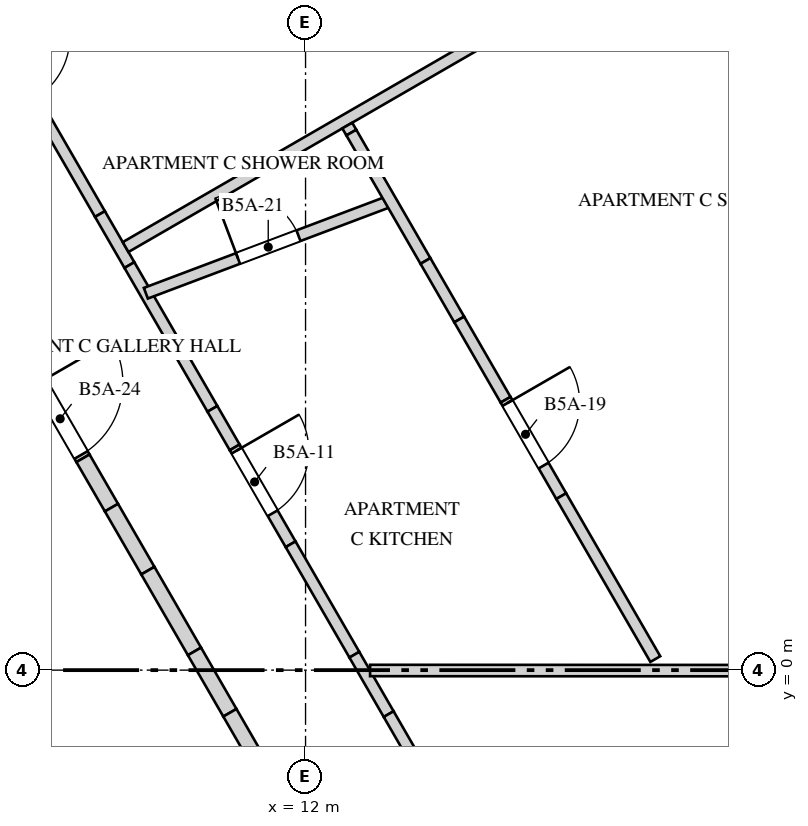
"""IFC4 building model, lengths in metres.
Left out: names, types, materials, properties, quantities, classifications, styles, units other than length and angle.
Written with IfcOpenShell. Run it as: python <this file> out.ifc"""

import sys

from ifc_helpers import new_model, si_unit, direction, frame, frame_2d, origin, place, context, subcontext, project, spatial, polyline, rectangle, outline, extrude, element, fill, save


model = new_model("IFC4")
c1 = context("Model", 3, precision=1e-05, world=origin(), true_north=direction((0.0, 1.0)))
c2 = subcontext(c1, "Body", "Model", "MODEL_VIEW")
j1 = project(units=[si_unit("LENGTHUNIT", "METRE"), si_unit("PLANEANGLEUNIT", "RADIAN")], contexts=[c1])
p1 = place(None, origin())
s1 = spatial("IfcSite", under=j1, at=p1, CompositionType="ELEMENT")
p2 = place(p1, origin())
s2 = spatial("IfcBuilding", under=s1, at=p2, CompositionType="ELEMENT")
p3 = place(p2, frame((0.0, 0.0, 200.0)))
s3 = spatial("IfcBuildingStorey", under=s2, at=p3, CompositionType="ELEMENT", Elevation=200.0)
p4 = place(p3, frame((9.815, -4.25, 0.0), z_axis=(0.0, 0.0, 1.0), x_axis=(-0.500002161919, 0.866024155596, 0.0)))
e1 = element("IfcWall", 1, at=p4, inside=s3, PredefinedType="SHEAR", context=c2, shape_type="SweptSolid", body=[
    extrude(rectangle(XDim=17.176, YDim=0.75, at=frame_2d((8.588, 0.0))), origin(), (0.0, 0.0, 1.0), 4.0),
])
p5 = place(p4, frame((6.863, 0.0, 0.0)))
e2 = element("IfcOpeningElement", 2, at=p5, cuts=e1, PredefinedType="OPENING", context=c2, shape_type="SweptSolid", body=[
    extrude(rectangle(XDim=1.0, YDim=2.4, at=frame_2d((0.5, 1.2))), frame((0.0, 0.385, 0.0), z_axis=(0.0, -1.0, 0.0), x_axis=(1.0, 0.0, 0.0)), (0.0, 0.0, 1.0), 0.77),
])
p6 = place(p3, frame((17.125, -5.254, 0.0), z_axis=(0.0, 0.0, 1.0), x_axis=(0.707106781187, 0.707106781187, 0.0)))
e3 = element("IfcWall", 3, at=p6, inside=s3, PredefinedType="SOLIDWALL", context=c2, shape_type="SweptSolid", body=[
    extrude(rectangle(XDim=6.594, YDim=0.45, at=frame_2d((3.297, 0.0))), origin(), (0.0, 0.0, 1.0), 3.3),
])
p7 = place(p6, frame((0.124, 0.0, 0.5)))
e4 = element("IfcOpeningElement", 4, at=p7, cuts=e3, PredefinedType="OPENING", context=c2, shape_type="SweptSolid", body=[
    extrude(rectangle(XDim=1.75, YDim=2.65, at=frame_2d((0.875, 1.325))), frame((0.0, 0.235, 0.0), z_axis=(0.0, -1.0, 0.0), x_axis=(1.0, 0.0, 0.0)), (0.0, 0.0, 1.0), 0.47),
])
p8 = place(p6, frame((2.422, 0.0, 0.5)))
e5 = element("IfcOpeningElement", 5, at=p8, cuts=e3, PredefinedType="OPENING", context=c2, shape_type="SweptSolid", body=[
    extrude(rectangle(XDim=1.75, YDim=2.65, at=frame_2d((0.875, 1.325))), frame((0.0, 0.235, 0.0), z_axis=(0.0, -1.0, 0.0), x_axis=(1.0, 0.0, 0.0)), (0.0, 0.0, 1.0), 0.47),
])
p9 = place(p6, frame((5.045, 0.0, 0.5)))
e6 = element("IfcOpeningElement", 6, at=p9, cuts=e3, PredefinedType="OPENING", context=c2, shape_type="SweptSolid", body=[
    extrude(rectangle(XDim=1.1, YDim=2.65, at=frame_2d((0.55, 1.325))), frame((0.0, 0.235, 0.0), z_axis=(0.0, -1.0, 0.0), x_axis=(1.0, 0.0, 0.0)), (0.0, 0.0, 1.0), 0.47),
])
p10 = place(p3, frame((8.911, -4.185, 0.0), z_axis=(0.0, 0.0, 1.0), x_axis=(-0.500009909098, 0.866019682689, 0.0)))
e7 = element("IfcWall", 7, at=p10, inside=s3, PredefinedType="SOLIDWALL", context=c2, shape_type="SweptSolid", body=[
    extrude(rectangle(XDim=6.2, YDim=0.55, at=frame_2d((3.1, 0.0))), origin(), (0.0, 0.0, 1.0), 3.65),
])
p11 = place(p3, frame((7.835, 8.529, 0.0), z_axis=(0.0, 0.0, 1.0), x_axis=(0.49998782916, -0.866032430508, 0.0)))
e8 = element("IfcWall", 8, at=p11, inside=s3, PredefinedType="PARTITIONING", context=c2, shape_type="SweptSolid", body=[
    extrude(rectangle(XDim=2.92, YDim=0.15, at=frame_2d((1.46, 0.0))), origin(), (0.0, 0.0, 1.0), 3.65),
])
p12 = place(p11, frame((0.228, 0.0, 0.0)))
e9 = element("IfcOpeningElement", 9, at=p12, cuts=e8, PredefinedType="OPENING", context=c2, shape_type="SweptSolid", body=[
    extrude(rectangle(XDim=0.95, YDim=2.4, at=frame_2d((0.475, 1.2))), frame((0.0, 0.085, 0.0), z_axis=(0.0, -1.0, 0.0), x_axis=(1.0, 0.0, 0.0)), (0.0, 0.0, 1.0), 0.17),
])
p13 = place(p3, frame((9.295, 6.0, 0.0), z_axis=(0.0, 0.0, 1.0), x_axis=(0.500204125617, -0.865907519724, 0.0)))
e10 = element("IfcWall", 10, at=p13, inside=s3, PredefinedType="PARTITIONING", context=c2, shape_type="SweptSolid", body=[
    extrude(rectangle(XDim=0.775, YDim=0.15, at=frame_2d((0.388, 0.0))), origin(), (0.0, 0.0, 1.0), 2.75),
])
p14 = place(p3, frame((9.683, 5.329, 0.0), z_axis=(0.0, 0.0, 1.0), x_axis=(0.499787711288, -0.866147934042, 0.0)))
e11 = element("IfcWall", 11, at=p14, inside=s3, PredefinedType="PARTITIONING", context=c2, shape_type="SweptSolid", body=[
    extrude(rectangle(XDim=1.295, YDim=0.15, at=frame_2d((0.648, 0.0))), origin(), (0.0, 0.0, 1.0), 3.65),
])
p15 = place(p3, frame((10.33, 4.207, 0.0), z_axis=(0.0, 0.0, 1.0), x_axis=(0.500245559984, -0.865883583235, 0.0)))
e12 = element("IfcWall", 12, at=p15, inside=s3, PredefinedType="PARTITIONING", context=c2, shape_type="SweptSolid", body=[
    extrude(rectangle(XDim=0.889, YDim=0.15, at=frame_2d((0.444, 0.0))), origin(), (0.0, 0.0, 1.0), 2.55),
])
p16 = place(p3, frame((10.775, 3.438, 0.0), z_axis=(0.0, 0.0, 1.0), x_axis=(0.499818765479, -0.866130014302, 0.0)))
e13 = element("IfcWall", 13, at=p16, inside=s3, PredefinedType="PARTITIONING", context=c2, shape_type="SweptSolid", body=[
    extrude(rectangle(XDim=0.585, YDim=0.15, at=frame_2d((0.292, 0.0))), origin(), (0.0, 0.0, 1.0), 3.65),
])
p17 = place(p3, frame((11.067, 2.931, 0.0), z_axis=(0.0, 0.0, 1.0), x_axis=(0.500009564119, -0.866019881867, 0.0)))
e14 = element("IfcWall", 14, at=p17, inside=s3, PredefinedType="PARTITIONING", context=c2, shape_type="SweptSolid", body=[
    extrude(outline(polyline([(0.0, 0.0), (1.472, 0.0), (1.472, 2.55), (0.541, 2.55), (0.541, 3.65), (0.0, 3.65), (0.0, 0.0)])), frame((0.0, 0.075, 0.0), z_axis=(0.0, -1.0, 0.0), x_axis=(1.0, 0.0, 0.0)), (0.0, 0.0, 1.0), 0.15),
])
p18 = place(p17, frame((0.05, 0.0, 0.0)))
e15 = element("IfcOpeningElement", 15, at=p18, cuts=e14, PredefinedType="OPENING", context=c2, shape_type="SweptSolid", body=[
    extrude(rectangle(XDim=0.95, YDim=2.4, at=frame_2d((0.475, 1.2))), frame((0.0, 0.085, 0.0), z_axis=(0.0, -1.0, 0.0), x_axis=(1.0, 0.0, 0.0)), (0.0, 0.0, 1.0), 0.17),
])
p19 = place(p3, frame((11.803, 1.656, 0.0), z_axis=(0.0, 0.0, 1.0), x_axis=(0.499974444137, -0.866040157966, 0.0)))
e16 = element("IfcWall", 16, at=p19, inside=s3, PredefinedType="PARTITIONING", context=c2, shape_type="SweptSolid", body=[
    extrude(rectangle(XDim=1.677, YDim=0.15, at=frame_2d((0.839, 0.0))), origin(), (0.0, 0.0, 1.0), 3.65),
])
p20 = place(p3, frame((12.642, 0.203, 0.0), z_axis=(0.0, 0.0, 1.0), x_axis=(0.500065807255, -0.865987406614, 0.0)))
e17 = element("IfcWall", 17, at=p20, inside=s3, PredefinedType="PARTITIONING", context=c2, shape_type="SweptSolid", body=[
    extrude(rectangle(XDim=0.903, YDim=0.15, at=frame_2d((0.451, 0.0))), origin(), (0.0, 0.0, 1.0), 2.75),
])
p21 = place(p3, frame((13.094, -0.579, 0.0), z_axis=(0.0, 0.0, 1.0), x_axis=(0.499991648869, -0.866030225258, 0.0)))
e18 = element("IfcWall", 18, at=p21, inside=s3, PredefinedType="PARTITIONING", context=c2, shape_type="SweptSolid", body=[
    extrude(rectangle(XDim=4.239, YDim=0.15, at=frame_2d((2.12, 0.0))), origin(), (0.0, 0.0, 1.0), 3.65),
])
p22 = place(p3, frame((9.633, 5.566, 0.0), z_axis=(0.0, 0.0, 1.0), x_axis=(0.865840987412, 0.500319282576, 0.0)))
e19 = element("IfcWall", 19, at=p22, inside=s3, PredefinedType="PARTITIONING", context=c2, shape_type="SweptSolid", body=[
    extrude(rectangle(XDim=10.928, YDim=0.15, at=frame_2d((5.464, 0.0))), origin(), (0.0, 0.0, 1.0), 2.75),
])
p23 = place(p3, frame((9.899, 4.959, 0.0), z_axis=(0.0, 0.0, 1.0), x_axis=(0.935727228965, 0.352724471752, 0.0)))
e20 = element("IfcWall", 20, at=p23, inside=s3, PredefinedType="PARTITIONING", context=c2, shape_type="SweptSolid", body=[
    extrude(rectangle(XDim=3.441, YDim=0.15, at=frame_2d((1.721, 0.0))), origin(), (0.0, 0.0, 1.0), 3.65),
])
p24 = place(p23, frame((1.296, 0.0, 0.0)))
e21 = element("IfcOpeningElement", 21, at=p24, cuts=e20, PredefinedType="OPENING", context=c2, shape_type="SweptSolid", body=[
    extrude(rectangle(XDim=0.85, YDim=2.4, at=frame_2d((0.425, 1.2))), frame((0.0, 0.085, 0.0), z_axis=(0.0, -1.0, 0.0), x_axis=(1.0, 0.0, 0.0)), (0.0, 0.0, 1.0), 0.17),
])
p25 = place(p3, frame((12.549, 7.165, 0.0), z_axis=(0.0, 0.0, 1.0), x_axis=(0.501036270542, -0.865426285481, 0.0)))
e22 = element("IfcWall", 22, at=p25, inside=s3, PredefinedType="PARTITIONING", context=c2, shape_type="SweptSolid", body=[
    extrude(rectangle(XDim=0.107, YDim=0.15, at=frame_2d((0.054, 0.0))), origin(), (0.0, 0.0, 1.0), 2.75),
])
p26 = place(p3, frame((12.603, 7.072, 0.0), z_axis=(0.0, 0.0, 1.0), x_axis=(0.49995005938, -0.866054235095, 0.0)))
e23 = element("IfcWall", 23, at=p26, inside=s3, PredefinedType="PARTITIONING", context=c2, shape_type="SweptSolid", body=[
    extrude(rectangle(XDim=1.95, YDim=0.15, at=frame_2d((0.975, 0.0))), origin(), (0.0, 0.0, 1.0), 3.65),
])
p27 = place(p3, frame((13.577, 5.383, 0.0), z_axis=(0.0, 0.0, 1.0), x_axis=(0.499920601425, -0.866071239721, 0.0)))
e24 = element("IfcWall", 24, at=p27, inside=s3, PredefinedType="PARTITIONING", context=c2, shape_type="SweptSolid", body=[
    extrude(rectangle(XDim=0.889, YDim=0.15, at=frame_2d((0.444, 0.0))), origin(), (0.0, 0.0, 1.0), 2.55),
])
p28 = place(p3, frame((14.022, 4.614, 0.0), z_axis=(0.0, 0.0, 1.0), x_axis=(0.50005746179, -0.865992225662, 0.0)))
e25 = element("IfcWall", 25, at=p28, inside=s3, PredefinedType="PARTITIONING", context=c2, shape_type="SweptSolid", body=[
    extrude(rectangle(XDim=1.219, YDim=0.15, at=frame_2d((0.61, 0.0))), origin(), (0.0, 0.0, 1.0), 3.65),
])
p29 = place(p3, frame((14.632, 3.557, 0.0), z_axis=(0.0, 0.0, 1.0), x_axis=(0.50003034938, -0.866007880853, 0.0)))
e26 = element("IfcWall", 26, at=p29, inside=s3, PredefinedType="PARTITIONING", context=c2, shape_type="SweptSolid", body=[
    extrude(outline(polyline([(0.0, 0.0), (1.464, 0.0), (1.464, 2.55), (0.534, 2.55), (0.534, 3.65), (0.0, 3.65), (0.0, 0.0)])), frame((0.0, 0.075, 0.0), z_axis=(0.0, -1.0, 0.0), x_axis=(1.0, 0.0, 0.0)), (0.0, 0.0, 1.0), 0.15),
])
p30 = place(p29, frame((0.05, 0.0, 0.0)))
e27 = element("IfcOpeningElement", 27, at=p30, cuts=e26, PredefinedType="OPENING", context=c2, shape_type="SweptSolid", body=[
    extrude(rectangle(XDim=0.95, YDim=2.4, at=frame_2d((0.475, 1.2))), frame((0.0, 0.085, 0.0), z_axis=(0.0, -1.0, 0.0), x_axis=(1.0, 0.0, 0.0)), (0.0, 0.0, 1.0), 0.17),
])
p31 = place(p3, frame((15.364, 2.289, 0.0), z_axis=(0.0, 0.0, 1.0), x_axis=(0.499978546328, -0.866037789714, 0.0)))
e28 = element("IfcWall", 28, at=p31, inside=s3, PredefinedType="PARTITIONING", context=c2, shape_type="SweptSolid", body=[
    extrude(rectangle(XDim=2.476, YDim=0.15, at=frame_2d((1.238, 0.0))), origin(), (0.0, 0.0, 1.0), 3.65),
])
p32 = place(p3, frame((22.053, -0.008, 0.0), z_axis=(0.0, 0.0, 1.0), x_axis=(-0.999999931056, 0.00037133306, 0.0)))
e29 = element("IfcWall", 29, at=p32, inside=s3, PredefinedType="PARTITIONING", context=c2, shape_type="SweptSolid", body=[
    extrude(rectangle(XDim=9.205, YDim=0.15, at=frame_2d((4.602, 0.0))), origin(), (0.0, 0.0, 1.0), 2.75),
])
p33 = place(p3, frame((8.472, 3.826, 0.0), z_axis=(0.0, 0.0, 1.0), x_axis=(0.500033551112, -0.866006032174, 0.0)))
e30 = element("IfcWall", 30, at=p33, inside=s3, PredefinedType="SOLIDWALL", context=c2, shape_type="SweptSolid", body=[
    extrude(outline(polyline([(0.0, 0.0), (1.2, 0.0), (1.2, 2.55), (0.267, 2.55), (0.267, 3.65), (0.0, 3.65), (0.0, 0.0)])), frame((0.0, 0.1, 0.0), z_axis=(0.0, -1.0, 0.0), x_axis=(1.0, 0.0, 0.0)), (0.0, 0.0, 1.0), 0.2),
])
p34 = place(p33, frame((0.05, 0.0, 0.0)))
e31 = element("IfcOpeningElement", 31, at=p34, cuts=e30, PredefinedType="OPENING", context=c2, shape_type="SweptSolid", body=[
    extrude(rectangle(XDim=1.1, YDim=2.4, at=frame_2d((0.55, 1.2))), frame((0.0, 0.11, 0.0), z_axis=(0.0, -1.0, 0.0), x_axis=(1.0, 0.0, 0.0)), (0.0, 0.0, 1.0), 0.22),
])
p35 = place(p3, frame((9.072, 2.787, 0.0), z_axis=(0.0, 0.0, 1.0), x_axis=(0.50020163859, -0.865908956387, 0.0)))
e32 = element("IfcWall", 32, at=p35, inside=s3, PredefinedType="SOLIDWALL", context=c2, shape_type="SweptSolid", body=[
    extrude(rectangle(XDim=0.75, YDim=0.2, at=frame_2d((0.375, 0.0))), origin(), (0.0, 0.0, 1.0), 3.65),
])
p36 = place(p3, frame((9.447, 2.138, 0.0), z_axis=(0.0, 0.0, 1.0), x_axis=(0.499869636591, -0.866100656052, 0.0)))
e33 = element("IfcWall", 33, at=p36, inside=s3, PredefinedType="SOLIDWALL", context=c2, shape_type="SweptSolid", body=[
    extrude(rectangle(XDim=0.957, YDim=0.2, at=frame_2d((0.479, 0.0))), origin(), (0.0, 0.0, 1.0), 2.55),
])
p37 = place(p3, frame((9.925, 1.309, 0.0), z_axis=(0.0, 0.0, 1.0), x_axis=(0.500055461028, -0.865993380977, 0.0)))
e34 = element("IfcWall", 34, at=p37, inside=s3, PredefinedType="SOLIDWALL", context=c2, shape_type="SweptSolid", body=[
    extrude(rectangle(XDim=1.227, YDim=0.2, at=frame_2d((0.613, 0.0))), origin(), (0.0, 0.0, 1.0), 3.65),
])
p38 = place(p3, frame((10.539, 0.246, 0.0), z_axis=(0.0, 0.0, 1.0), x_axis=(0.499971966783, -0.866041588165, 0.0)))
e35 = element("IfcWall", 35, at=p38, inside=s3, PredefinedType="SOLIDWALL", context=c2, shape_type="SweptSolid", body=[
    extrude(rectangle(XDim=0.932, YDim=0.2, at=frame_2d((0.466, 0.0))), origin(), (0.0, 0.0, 1.0), 2.75),
])
p39 = place(p3, frame((11.005, -0.561, 0.0), z_axis=(0.0, 0.0, 1.0), x_axis=(0.499993700073, -0.866029041019, 0.0)))
e36 = element("IfcWall", 36, at=p39, inside=s3, PredefinedType="SOLIDWALL", context=c2, shape_type="SweptSolid", body=[
    extrude(rectangle(XDim=4.155, YDim=0.2, at=frame_2d((2.078, 0.0))), origin(), (0.0, 0.0, 1.0), 3.65),
])
p40 = place(p18, origin())
e37 = element("IfcDoor", 37, at=p40, inside=s3, OperationType="SINGLE_SWING_LEFT", PredefinedType="DOOR", context=c2, shape_type="SweptSolid", body=[
    extrude(rectangle(XDim=0.95, YDim=2.4, at=frame_2d((0.475, 1.2))), frame((0.0, 0.025, 0.0), z_axis=(0.0, -1.0, 0.0), x_axis=(1.0, 0.0, 0.0)), (0.0, 0.0, 1.0), 0.05),
])
fill(e15, e37)
p41 = place(p30, origin())
e38 = element("IfcDoor", 38, at=p41, inside=s3, OperationType="SINGLE_SWING_LEFT", PredefinedType="DOOR", context=c2, shape_type="SweptSolid", body=[
    extrude(rectangle(XDim=0.95, YDim=2.4, at=frame_2d((0.475, 1.2))), frame((0.0, 0.025, 0.0), z_axis=(0.0, -1.0, 0.0), x_axis=(1.0, 0.0, 0.0)), (0.0, 0.0, 1.0), 0.05),
])
fill(e27, e38)
p42 = place(p24, origin())
e39 = element("IfcDoor", 39, at=p42, inside=s3, OperationType="SINGLE_SWING_LEFT", PredefinedType="DOOR", context=c2, shape_type="SweptSolid", body=[
    extrude(rectangle(XDim=0.85, YDim=2.4, at=frame_2d((0.425, 1.2))), frame((0.0, 0.025, 0.0), z_axis=(0.0, -1.0, 0.0), x_axis=(1.0, 0.0, 0.0)), (0.0, 0.0, 1.0), 0.05),
])
fill(e21, e39)
p43 = place(p34, origin())
e40 = element("IfcDoor", 40, at=p43, inside=s3, OperationType="SINGLE_SWING_RIGHT", PredefinedType="DOOR", context=c2, shape_type="SweptSolid", body=[
    extrude(rectangle(XDim=1.1, YDim=2.4, at=frame_2d((0.55, 1.2))), frame((0.0, 0.025, 0.0), z_axis=(0.0, -1.0, 0.0), x_axis=(1.0, 0.0, 0.0)), (0.0, 0.0, 1.0), 0.05),
])
fill(e31, e40)
save(model, sys.argv[1])
